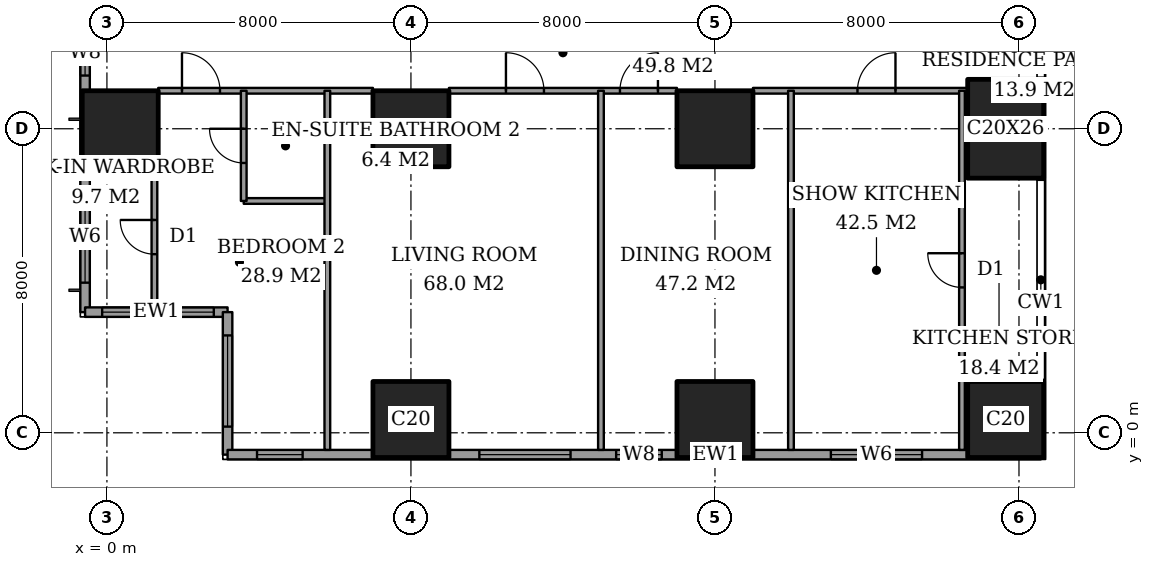
"""IFC4 building model, lengths in metres.
Left out: names, types, materials, properties, quantities, classifications, styles, units other than length and angle.
Written with IfcOpenShell. Run it as: python <this file> out.ifc"""

import sys

from ifc_helpers import new_model, si_unit, direction, frame, frame_2d, origin, origin_2d, place, context, subcontext, project, spatial, rectangle, extrude, element, fill, save


model = new_model("IFC4")
c1 = context("Model", 3, precision=1e-05, world=origin(), true_north=direction((0.0, 1.0)))
c2 = subcontext(c1, "Body", "Model", "MODEL_VIEW")
j1 = project(units=[si_unit("LENGTHUNIT", "METRE"), si_unit("PLANEANGLEUNIT", "RADIAN")], contexts=[c1])
p1 = place(None, origin())
s1 = spatial("IfcSite", under=j1, at=p1, CompositionType="ELEMENT")
p2 = place(p1, origin())
s2 = spatial("IfcBuilding", under=s1, at=p2, CompositionType="ELEMENT")
p3 = place(p2, frame((0.0, 0.0, 76.4)))
s3 = spatial("IfcBuildingStorey", under=s2, at=p3, CompositionType="ELEMENT", Elevation=76.4)
for number, where, z_axis, x_axis in (
    (1, (0.35, 8.0, 0.0), (0.0, 0.0, 1.0), (1.0, 0.0, 0.0)),
    (2, (8.0, 0.35, 0.0), (0.0, 0.0, 1.0), (1.0, 0.0, 0.0)),
    (3, (8.0, 8.0, 0.0), (0.0, 0.0, 1.0), (1.0, 0.0, 0.0)),
    (4, (16.0, 0.35, 0.0), (0.0, 0.0, 1.0), (1.0, 0.0, 0.0)),
    (5, (16.0, 8.0, 0.0), (0.0, 0.0, 1.0), (1.0, 0.0, 0.0)),
    (6, (23.65, 0.35, 0.0), (0.0, 0.0, 1.0), (1.0, 0.0, 0.0)),
):
    element("IfcColumn", number, at=place(p3, frame(where, z_axis=z_axis, x_axis=x_axis)), inside=s3, PredefinedType="COLUMN", context=c2, shape_type="SweptSolid", body=[
        extrude(rectangle(XDim=2.0, YDim=2.0, at=origin_2d()), origin(), (0.0, 0.0, 1.0), 3.6),
    ])
p4 = place(p3, frame((23.65, 8.0, 0.0), z_axis=(0.0, 0.0, 1.0), x_axis=(1.0, 0.0, 0.0)))
e7 = element("IfcColumn", 7, at=p4, inside=s3, PredefinedType="COLUMN", context=c2, shape_type="SweptSolid", body=[
    extrude(rectangle(XDim=2.0, YDim=2.6, at=origin_2d()), origin(), (0.0, 0.0, 1.0), 3.6),
])
p5 = place(p3, frame((-0.575, 44.825, 0.0), z_axis=(0.0, 0.0, 1.0), x_axis=(0.0, -1.0, 0.0)))
e8 = element("IfcWall", 8, at=p5, inside=s3, PredefinedType="SOLIDWALL", context=c2, shape_type="SweptSolid", body=[
    extrude(rectangle(XDim=41.65, YDim=0.25, at=frame_2d((20.825, 0.0))), origin(), (0.0, 0.0, 1.0), 3.6),
])
p6 = place(p5, frame((0.775, 0.0, 0.6)))
e9 = element("IfcOpeningElement", 9, at=p6, cuts=e8, PredefinedType="OPENING", context=c2, shape_type="SweptSolid", body=[
    extrude(rectangle(XDim=2.4, YDim=2.0, at=frame_2d((1.2, 1.0))), frame((0.0, 0.135, 0.0), z_axis=(0.0, -1.0, 0.0), x_axis=(1.0, 0.0, 0.0)), (0.0, 0.0, 1.0), 0.27),
])
p7 = place(p5, frame((6.1, 0.0, 0.6)))
e10 = element("IfcOpeningElement", 10, at=p7, cuts=e8, PredefinedType="OPENING", context=c2, shape_type="SweptSolid", body=[
    extrude(rectangle(XDim=1.2, YDim=2.0, at=frame_2d((0.6, 1.0))), frame((0.0, 0.135, 0.0), z_axis=(0.0, -1.0, 0.0), x_axis=(1.0, 0.0, 0.0)), (0.0, 0.0, 1.0), 0.27),
])
p8 = place(p5, frame((8.425, 0.0, 0.6)))
e11 = element("IfcOpeningElement", 11, at=p8, cuts=e8, PredefinedType="OPENING", context=c2, shape_type="SweptSolid", body=[
    extrude(rectangle(XDim=2.4, YDim=2.0, at=frame_2d((1.2, 1.0))), frame((0.0, 0.135, 0.0), z_axis=(0.0, -1.0, 0.0), x_axis=(1.0, 0.0, 0.0)), (0.0, 0.0, 1.0), 0.27),
])
p9 = place(p5, frame((15.625, 0.0, 0.6)))
e12 = element("IfcOpeningElement", 12, at=p9, cuts=e8, PredefinedType="OPENING", context=c2, shape_type="SweptSolid", body=[
    extrude(rectangle(XDim=2.4, YDim=2.0, at=frame_2d((1.2, 1.0))), frame((0.0, 0.135, 0.0), z_axis=(0.0, -1.0, 0.0), x_axis=(1.0, 0.0, 0.0)), (0.0, 0.0, 1.0), 0.27),
])
p10 = place(p5, frame((23.625, 0.0, 0.6)))
e13 = element("IfcOpeningElement", 13, at=p10, cuts=e8, PredefinedType="OPENING", context=c2, shape_type="SweptSolid", body=[
    extrude(rectangle(XDim=2.4, YDim=2.0, at=frame_2d((1.2, 1.0))), frame((0.0, 0.135, 0.0), z_axis=(0.0, -1.0, 0.0), x_axis=(1.0, 0.0, 0.0)), (0.0, 0.0, 1.0), 0.27),
])
p11 = place(p5, frame((30.625, 0.0, 0.6)))
e14 = element("IfcOpeningElement", 14, at=p11, cuts=e8, PredefinedType="OPENING", context=c2, shape_type="SweptSolid", body=[
    extrude(rectangle(XDim=2.4, YDim=2.0, at=frame_2d((1.2, 1.0))), frame((0.0, 0.135, 0.0), z_axis=(0.0, -1.0, 0.0), x_axis=(1.0, 0.0, 0.0)), (0.0, 0.0, 1.0), 0.27),
])
p12 = place(p5, frame((34.225, 0.0, 0.6)))
e15 = element("IfcOpeningElement", 15, at=p12, cuts=e8, PredefinedType="OPENING", context=c2, shape_type="SweptSolid", body=[
    extrude(rectangle(XDim=1.2, YDim=2.0, at=frame_2d((0.6, 1.0))), frame((0.0, 0.135, 0.0), z_axis=(0.0, -1.0, 0.0), x_axis=(1.0, 0.0, 0.0)), (0.0, 0.0, 1.0), 0.27),
])
p13 = place(p5, frame((38.475, 0.0, 0.6)))
e16 = element("IfcOpeningElement", 16, at=p13, cuts=e8, PredefinedType="OPENING", context=c2, shape_type="SweptSolid", body=[
    extrude(rectangle(XDim=2.4, YDim=2.0, at=frame_2d((1.2, 1.0))), frame((0.0, 0.135, 0.0), z_axis=(0.0, -1.0, 0.0), x_axis=(1.0, 0.0, 0.0)), (0.0, 0.0, 1.0), 0.27),
])
p14 = place(p3, frame((-0.575, 3.175, 0.0), z_axis=(0.0, 0.0, 1.0), x_axis=(1.0, 0.0, 0.0)))
e17 = element("IfcWall", 17, at=p14, inside=s3, PredefinedType="SOLIDWALL", context=c2, shape_type="SweptSolid", body=[
    extrude(rectangle(XDim=3.75, YDim=0.25, at=frame_2d((1.875, 0.0))), origin(), (0.0, 0.0, 1.0), 3.6),
])
p15 = place(p14, frame((0.45, 0.0, 0.6)))
e18 = element("IfcOpeningElement", 18, at=p15, cuts=e17, PredefinedType="OPENING", context=c2, shape_type="SweptSolid", body=[
    extrude(rectangle(XDim=1.2, YDim=2.0, at=frame_2d((0.6, 1.0))), frame((0.0, 0.135, 0.0), z_axis=(0.0, -1.0, 0.0), x_axis=(1.0, 0.0, 0.0)), (0.0, 0.0, 1.0), 0.27),
])
p16 = place(p14, frame((2.188, 0.0, 0.6)))
e19 = element("IfcOpeningElement", 19, at=p16, cuts=e17, PredefinedType="OPENING", context=c2, shape_type="SweptSolid", body=[
    extrude(rectangle(XDim=1.2, YDim=2.0, at=frame_2d((0.6, 1.0))), frame((0.0, 0.135, 0.0), z_axis=(0.0, -1.0, 0.0), x_axis=(1.0, 0.0, 0.0)), (0.0, 0.0, 1.0), 0.27),
])
p17 = place(p3, frame((3.175, 3.175, 0.0), z_axis=(0.0, 0.0, 1.0), x_axis=(0.0, -1.0, 0.0)))
e20 = element("IfcWall", 20, at=p17, inside=s3, PredefinedType="SOLIDWALL", context=c2, shape_type="SweptSolid", body=[
    extrude(rectangle(XDim=3.75, YDim=0.25, at=frame_2d((1.875, 0.0))), origin(), (0.0, 0.0, 1.0), 3.6),
])
p18 = place(p17, frame((0.613, 0.0, 0.6)))
e21 = element("IfcOpeningElement", 21, at=p18, cuts=e20, PredefinedType="OPENING", context=c2, shape_type="SweptSolid", body=[
    extrude(rectangle(XDim=2.4, YDim=2.0, at=frame_2d((1.2, 1.0))), frame((0.0, 0.135, 0.0), z_axis=(0.0, -1.0, 0.0), x_axis=(1.0, 0.0, 0.0)), (0.0, 0.0, 1.0), 0.27),
])
p19 = place(p3, frame((3.175, -0.575, 0.0), z_axis=(0.0, 0.0, 1.0), x_axis=(1.0, 0.0, 0.0)))
e22 = element("IfcWall", 22, at=p19, inside=s3, PredefinedType="SOLIDWALL", context=c2, shape_type="SweptSolid", body=[
    extrude(rectangle(XDim=21.4, YDim=0.25, at=frame_2d((10.7, 0.0))), origin(), (0.0, 0.0, 1.0), 3.6),
])
p20 = place(p19, frame((0.775, 0.0, 0.6)))
e23 = element("IfcOpeningElement", 23, at=p20, cuts=e22, PredefinedType="OPENING", context=c2, shape_type="SweptSolid", body=[
    extrude(rectangle(XDim=1.2, YDim=2.0, at=frame_2d((0.6, 1.0))), frame((0.0, 0.135, 0.0), z_axis=(0.0, -1.0, 0.0), x_axis=(1.0, 0.0, 0.0)), (0.0, 0.0, 1.0), 0.27),
])
p21 = place(p19, frame((6.625, 0.0, 0.6)))
e24 = element("IfcOpeningElement", 24, at=p21, cuts=e22, PredefinedType="OPENING", context=c2, shape_type="SweptSolid", body=[
    extrude(rectangle(XDim=2.4, YDim=2.0, at=frame_2d((1.2, 1.0))), frame((0.0, 0.135, 0.0), z_axis=(0.0, -1.0, 0.0), x_axis=(1.0, 0.0, 0.0)), (0.0, 0.0, 1.0), 0.27),
])
p22 = place(p19, frame((10.225, 0.0, 0.6)))
e25 = element("IfcOpeningElement", 25, at=p22, cuts=e22, PredefinedType="OPENING", context=c2, shape_type="SweptSolid", body=[
    extrude(rectangle(XDim=1.2, YDim=2.0, at=frame_2d((0.6, 1.0))), frame((0.0, 0.135, 0.0), z_axis=(0.0, -1.0, 0.0), x_axis=(1.0, 0.0, 0.0)), (0.0, 0.0, 1.0), 0.27),
])
p23 = place(p19, frame((15.875, 0.0, 0.6)))
e26 = element("IfcOpeningElement", 26, at=p23, cuts=e22, PredefinedType="OPENING", context=c2, shape_type="SweptSolid", body=[
    extrude(rectangle(XDim=2.4, YDim=2.0, at=frame_2d((1.2, 1.0))), frame((0.0, 0.135, 0.0), z_axis=(0.0, -1.0, 0.0), x_axis=(1.0, 0.0, 0.0)), (0.0, 0.0, 1.0), 0.27),
])
p24 = place(p3, frame((3.6, 6.1, 0.0), z_axis=(0.0, 0.0, 1.0), x_axis=(1.0, 0.0, 0.0)))
e27 = element("IfcWall", 27, at=p24, inside=s3, PredefinedType="PARTITIONING", context=c2, shape_type="SweptSolid", body=[
    extrude(rectangle(XDim=2.2, YDim=0.15, at=frame_2d((1.1, 0.0))), origin(), (0.0, 0.0, 1.0), 3.35),
])
p25 = place(p3, frame((1.35, 9.0, 0.0), z_axis=(0.0, 0.0, 1.0), x_axis=(1.0, 0.0, 0.0)))
e28 = element("IfcWall", 28, at=p25, inside=s3, PredefinedType="PARTITIONING", context=c2, shape_type="SweptSolid", body=[
    extrude(rectangle(XDim=5.65, YDim=0.15, at=frame_2d((2.825, 0.0))), origin(), (0.0, 0.0, 1.0), 3.35),
])
p26 = place(p25, frame((0.625, 0.0, 0.0)))
e29 = element("IfcOpeningElement", 29, at=p26, cuts=e28, PredefinedType="OPENING", context=c2, shape_type="SweptSolid", body=[
    extrude(rectangle(XDim=1.0, YDim=2.1, at=frame_2d((0.5, 1.05))), frame((0.0, 0.085, 0.0), z_axis=(0.0, -1.0, 0.0), x_axis=(1.0, 0.0, 0.0)), (0.0, 0.0, 1.0), 0.17),
])
p27 = place(p3, frame((9.0, 9.0, 0.0), z_axis=(0.0, 0.0, 1.0), x_axis=(1.0, 0.0, 0.0)))
e30 = element("IfcWall", 30, at=p27, inside=s3, PredefinedType="PARTITIONING", context=c2, shape_type="SweptSolid", body=[
    extrude(rectangle(XDim=6.0, YDim=0.15, at=frame_2d((3.0, 0.0))), origin(), (0.0, 0.0, 1.0), 3.35),
])
p28 = place(p27, frame((1.5, 0.0, 0.0)))
e31 = element("IfcOpeningElement", 31, at=p28, cuts=e30, PredefinedType="OPENING", context=c2, shape_type="SweptSolid", body=[
    extrude(rectangle(XDim=1.0, YDim=2.1, at=frame_2d((0.5, 1.05))), frame((0.0, 0.085, 0.0), z_axis=(0.0, -1.0, 0.0), x_axis=(1.0, 0.0, 0.0)), (0.0, 0.0, 1.0), 0.17),
])
p29 = place(p27, frame((4.5, 0.0, 0.0)))
e32 = element("IfcOpeningElement", 32, at=p29, cuts=e30, PredefinedType="OPENING", context=c2, shape_type="SweptSolid", body=[
    extrude(rectangle(XDim=1.0, YDim=2.1, at=frame_2d((0.5, 1.05))), frame((0.0, 0.085, 0.0), z_axis=(0.0, -1.0, 0.0), x_axis=(1.0, 0.0, 0.0)), (0.0, 0.0, 1.0), 0.17),
])
p30 = place(p3, frame((17.0, 9.0, 0.0), z_axis=(0.0, 0.0, 1.0), x_axis=(1.0, 0.0, 0.0)))
e33 = element("IfcWall", 33, at=p30, inside=s3, PredefinedType="PARTITIONING", context=c2, shape_type="SweptSolid", body=[
    extrude(rectangle(XDim=5.65, YDim=0.15, at=frame_2d((2.825, 0.0))), origin(), (0.0, 0.0, 1.0), 3.35),
])
p31 = place(p30, frame((2.75, 0.0, 0.0)))
e34 = element("IfcOpeningElement", 34, at=p31, cuts=e33, PredefinedType="OPENING", context=c2, shape_type="SweptSolid", body=[
    extrude(rectangle(XDim=1.0, YDim=2.1, at=frame_2d((0.5, 1.05))), frame((0.0, 0.085, 0.0), z_axis=(0.0, -1.0, 0.0), x_axis=(1.0, 0.0, 0.0)), (0.0, 0.0, 1.0), 0.17),
])
p32 = place(p3, frame((1.25, 3.3, 0.0), z_axis=(0.0, 0.0, 1.0), x_axis=(0.0, 1.0, 0.0)))
e35 = element("IfcWall", 35, at=p32, inside=s3, PredefinedType="PARTITIONING", context=c2, shape_type="SweptSolid", body=[
    extrude(rectangle(XDim=3.7, YDim=0.15, at=frame_2d((1.85, 0.0))), origin(), (0.0, 0.0, 1.0), 3.35),
])
p33 = place(p32, frame((1.4, 0.0, 0.0)))
e36 = element("IfcOpeningElement", 36, at=p33, cuts=e35, PredefinedType="OPENING", context=c2, shape_type="SweptSolid", body=[
    extrude(rectangle(XDim=0.9, YDim=2.1, at=frame_2d((0.45, 1.05))), frame((0.0, 0.085, 0.0), z_axis=(0.0, -1.0, 0.0), x_axis=(1.0, 0.0, 0.0)), (0.0, 0.0, 1.0), 0.17),
])
p34 = place(p3, frame((3.6, 6.1, 0.0), z_axis=(0.0, 0.0, 1.0), x_axis=(0.0, 1.0, 0.0)))
e37 = element("IfcWall", 37, at=p34, inside=s3, PredefinedType="PARTITIONING", context=c2, shape_type="SweptSolid", body=[
    extrude(rectangle(XDim=2.9, YDim=0.15, at=frame_2d((1.45, 0.0))), origin(), (0.0, 0.0, 1.0), 3.35),
])
p35 = place(p34, frame((1.0, 0.0, 0.0)))
e38 = element("IfcOpeningElement", 38, at=p35, cuts=e37, PredefinedType="OPENING", context=c2, shape_type="SweptSolid", body=[
    extrude(rectangle(XDim=0.9, YDim=2.1, at=frame_2d((0.45, 1.05))), frame((0.0, 0.085, 0.0), z_axis=(0.0, -1.0, 0.0), x_axis=(1.0, 0.0, 0.0)), (0.0, 0.0, 1.0), 0.17),
])
for number, where, z_axis, x_axis in (
    (39, (5.8, -0.45, 0.0), (0.0, 0.0, 1.0), (0.0, 1.0, 0.0)),
    (40, (13.0, -0.45, 0.0), (0.0, 0.0, 1.0), (0.0, 1.0, 0.0)),
    (41, (18.0, -0.45, 0.0), (0.0, 0.0, 1.0), (0.0, 1.0, 0.0)),
):
    element("IfcWall", number, at=place(p3, frame(where, z_axis=z_axis, x_axis=x_axis)), inside=s3, PredefinedType="PARTITIONING", context=c2, shape_type="SweptSolid", body=[
        extrude(rectangle(XDim=9.45, YDim=0.15, at=frame_2d((4.725, 0.0))), origin(), (0.0, 0.0, 1.0), 3.35),
    ])
p36 = place(p3, frame((22.5, -0.45, 0.0), z_axis=(0.0, 0.0, 1.0), x_axis=(0.0, 1.0, 0.0)))
e42 = element("IfcWall", 42, at=p36, inside=s3, PredefinedType="PARTITIONING", context=c2, shape_type="SweptSolid", body=[
    extrude(rectangle(XDim=9.45, YDim=0.15, at=frame_2d((4.725, 0.0))), origin(), (0.0, 0.0, 1.0), 3.35),
])
p37 = place(p36, frame((4.275, 0.0, 0.0)))
e43 = element("IfcOpeningElement", 43, at=p37, cuts=e42, PredefinedType="OPENING", context=c2, shape_type="SweptSolid", body=[
    extrude(rectangle(XDim=0.9, YDim=2.1, at=frame_2d((0.45, 1.05))), frame((0.0, 0.085, 0.0), z_axis=(0.0, -1.0, 0.0), x_axis=(1.0, 0.0, 0.0)), (0.0, 0.0, 1.0), 0.17),
])
p38 = place(p12, origin())
e44 = element("IfcWindow", 44, at=p38, inside=s3, PartitioningType="SINGLE_PANEL", PredefinedType="WINDOW", context=c2, shape_type="SweptSolid", body=[
    extrude(rectangle(XDim=1.2, YDim=2.0, at=frame_2d((0.6, 1.0))), frame((0.0, 0.03, 0.0), z_axis=(0.0, -1.0, 0.0), x_axis=(1.0, 0.0, 0.0)), (0.0, 0.0, 1.0), 0.06),
])
fill(e15, e44)
p39 = place(p13, origin())
e45 = element("IfcWindow", 45, at=p39, inside=s3, PartitioningType="SINGLE_PANEL", PredefinedType="WINDOW", context=c2, shape_type="SweptSolid", body=[
    extrude(rectangle(XDim=2.4, YDim=2.0, at=frame_2d((1.2, 1.0))), frame((0.0, 0.03, 0.0), z_axis=(0.0, -1.0, 0.0), x_axis=(1.0, 0.0, 0.0)), (0.0, 0.0, 1.0), 0.06),
])
fill(e16, e45)
p40 = place(p15, origin())
e46 = element("IfcWindow", 46, at=p40, inside=s3, PartitioningType="SINGLE_PANEL", PredefinedType="WINDOW", context=c2, shape_type="SweptSolid", body=[
    extrude(rectangle(XDim=1.2, YDim=2.0, at=frame_2d((0.6, 1.0))), frame((0.0, 0.03, 0.0), z_axis=(0.0, -1.0, 0.0), x_axis=(1.0, 0.0, 0.0)), (0.0, 0.0, 1.0), 0.06),
])
fill(e18, e46)
p41 = place(p16, origin())
e47 = element("IfcWindow", 47, at=p41, inside=s3, PartitioningType="SINGLE_PANEL", PredefinedType="WINDOW", context=c2, shape_type="SweptSolid", body=[
    extrude(rectangle(XDim=1.2, YDim=2.0, at=frame_2d((0.6, 1.0))), frame((0.0, 0.03, 0.0), z_axis=(0.0, -1.0, 0.0), x_axis=(1.0, 0.0, 0.0)), (0.0, 0.0, 1.0), 0.06),
])
fill(e19, e47)
p42 = place(p18, origin())
e48 = element("IfcWindow", 48, at=p42, inside=s3, PartitioningType="SINGLE_PANEL", PredefinedType="WINDOW", context=c2, shape_type="SweptSolid", body=[
    extrude(rectangle(XDim=2.4, YDim=2.0, at=frame_2d((1.2, 1.0))), frame((0.0, 0.03, 0.0), z_axis=(0.0, -1.0, 0.0), x_axis=(1.0, 0.0, 0.0)), (0.0, 0.0, 1.0), 0.06),
])
fill(e21, e48)
p43 = place(p20, origin())
e49 = element("IfcWindow", 49, at=p43, inside=s3, PartitioningType="SINGLE_PANEL", PredefinedType="WINDOW", context=c2, shape_type="SweptSolid", body=[
    extrude(rectangle(XDim=1.2, YDim=2.0, at=frame_2d((0.6, 1.0))), frame((0.0, 0.03, 0.0), z_axis=(0.0, -1.0, 0.0), x_axis=(1.0, 0.0, 0.0)), (0.0, 0.0, 1.0), 0.06),
])
fill(e23, e49)
p44 = place(p21, origin())
e50 = element("IfcWindow", 50, at=p44, inside=s3, PartitioningType="SINGLE_PANEL", PredefinedType="WINDOW", context=c2, shape_type="SweptSolid", body=[
    extrude(rectangle(XDim=2.4, YDim=2.0, at=frame_2d((1.2, 1.0))), frame((0.0, 0.03, 0.0), z_axis=(0.0, -1.0, 0.0), x_axis=(1.0, 0.0, 0.0)), (0.0, 0.0, 1.0), 0.06),
])
fill(e24, e50)
p45 = place(p22, origin())
e51 = element("IfcWindow", 51, at=p45, inside=s3, PartitioningType="SINGLE_PANEL", PredefinedType="WINDOW", context=c2, shape_type="SweptSolid", body=[
    extrude(rectangle(XDim=1.2, YDim=2.0, at=frame_2d((0.6, 1.0))), frame((0.0, 0.03, 0.0), z_axis=(0.0, -1.0, 0.0), x_axis=(1.0, 0.0, 0.0)), (0.0, 0.0, 1.0), 0.06),
])
fill(e25, e51)
p46 = place(p23, origin())
e52 = element("IfcWindow", 52, at=p46, inside=s3, PartitioningType="SINGLE_PANEL", PredefinedType="WINDOW", context=c2, shape_type="SweptSolid", body=[
    extrude(rectangle(XDim=2.4, YDim=2.0, at=frame_2d((1.2, 1.0))), frame((0.0, 0.03, 0.0), z_axis=(0.0, -1.0, 0.0), x_axis=(1.0, 0.0, 0.0)), (0.0, 0.0, 1.0), 0.06),
])
fill(e26, e52)
p47 = place(p33, origin())
e53 = element("IfcDoor", 53, at=p47, inside=s3, OperationType="SINGLE_SWING_LEFT", PredefinedType="DOOR", context=c2, shape_type="SweptSolid", body=[
    extrude(rectangle(XDim=0.9, YDim=2.1, at=frame_2d((0.45, 1.05))), frame((0.0, 0.025, 0.0), z_axis=(0.0, -1.0, 0.0), x_axis=(1.0, 0.0, 0.0)), (0.0, 0.0, 1.0), 0.05),
])
fill(e36, e53)
p48 = place(p35, origin())
e54 = element("IfcDoor", 54, at=p48, inside=s3, OperationType="SINGLE_SWING_LEFT", PredefinedType="DOOR", context=c2, shape_type="SweptSolid", body=[
    extrude(rectangle(XDim=0.9, YDim=2.1, at=frame_2d((0.45, 1.05))), frame((0.0, 0.025, 0.0), z_axis=(0.0, -1.0, 0.0), x_axis=(1.0, 0.0, 0.0)), (0.0, 0.0, 1.0), 0.05),
])
fill(e38, e54)
p49 = place(p26, origin())
e55 = element("IfcDoor", 55, at=p49, inside=s3, OperationType="SINGLE_SWING_RIGHT", PredefinedType="DOOR", context=c2, shape_type="SweptSolid", body=[
    extrude(rectangle(XDim=1.0, YDim=2.1, at=frame_2d((0.5, 1.05))), frame((0.0, 0.025, 0.0), z_axis=(0.0, -1.0, 0.0), x_axis=(1.0, 0.0, 0.0)), (0.0, 0.0, 1.0), 0.05),
])
fill(e29, e55)
p50 = place(p28, origin())
e56 = element("IfcDoor", 56, at=p50, inside=s3, OperationType="SINGLE_SWING_RIGHT", PredefinedType="DOOR", context=c2, shape_type="SweptSolid", body=[
    extrude(rectangle(XDim=1.0, YDim=2.1, at=frame_2d((0.5, 1.05))), frame((0.0, 0.025, 0.0), z_axis=(0.0, -1.0, 0.0), x_axis=(1.0, 0.0, 0.0)), (0.0, 0.0, 1.0), 0.05),
])
fill(e31, e56)
p51 = place(p29, origin())
e57 = element("IfcDoor", 57, at=p51, inside=s3, OperationType="SINGLE_SWING_LEFT", PredefinedType="DOOR", context=c2, shape_type="SweptSolid", body=[
    extrude(rectangle(XDim=1.0, YDim=2.1, at=frame_2d((0.5, 1.05))), frame((0.0, 0.025, 0.0), z_axis=(0.0, -1.0, 0.0), x_axis=(1.0, 0.0, 0.0)), (0.0, 0.0, 1.0), 0.05),
])
fill(e32, e57)
p52 = place(p31, origin())
e58 = element("IfcDoor", 58, at=p52, inside=s3, OperationType="SINGLE_SWING_LEFT", PredefinedType="DOOR", context=c2, shape_type="SweptSolid", body=[
    extrude(rectangle(XDim=1.0, YDim=2.1, at=frame_2d((0.5, 1.05))), frame((0.0, 0.025, 0.0), z_axis=(0.0, -1.0, 0.0), x_axis=(1.0, 0.0, 0.0)), (0.0, 0.0, 1.0), 0.05),
])
fill(e34, e58)
p53 = place(p37, origin())
e59 = element("IfcDoor", 59, at=p53, inside=s3, OperationType="SINGLE_SWING_LEFT", PredefinedType="DOOR", context=c2, shape_type="SweptSolid", body=[
    extrude(rectangle(XDim=0.9, YDim=2.1, at=frame_2d((0.45, 1.05))), frame((0.0, 0.025, 0.0), z_axis=(0.0, -1.0, 0.0), x_axis=(1.0, 0.0, 0.0)), (0.0, 0.0, 1.0), 0.05),
])
fill(e43, e59)
save(model, sys.argv[1])
